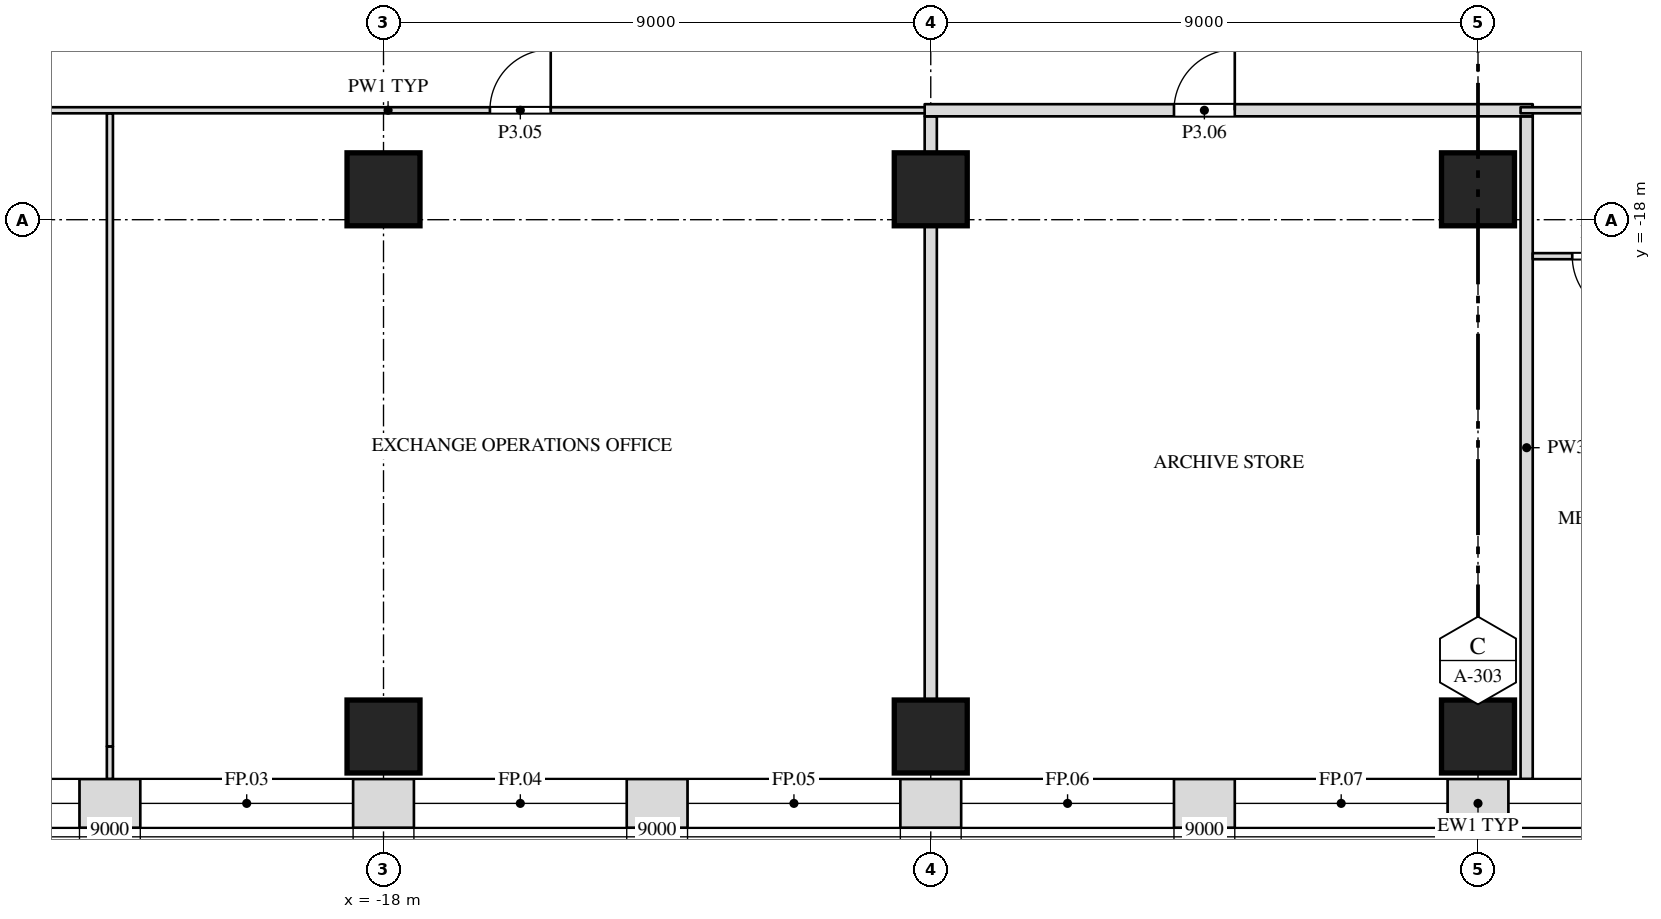
"""IFC4 building model, lengths in metres.
Left out: names, types, materials, properties, quantities, classifications, styles, units other than length and angle.
Written with IfcOpenShell. Run it as: python <this file> out.ifc"""

import sys

from ifc_helpers import new_model, si_unit, direction, frame, frame_2d, origin, origin_2d, place, context, subcontext, project, spatial, rectangle, extrude, element, fill, save


model = new_model("IFC4")
c1 = context("Model", 3, precision=1e-05, world=origin(), true_north=direction((0.0, 1.0)))
c2 = subcontext(c1, "Body", "Model", "MODEL_VIEW")
j1 = project(units=[si_unit("LENGTHUNIT", "METRE"), si_unit("PLANEANGLEUNIT", "RADIAN")], contexts=[c1])
p1 = place(None, origin())
s1 = spatial("IfcSite", under=j1, at=p1, CompositionType="ELEMENT")
p2 = place(p1, origin())
s2 = spatial("IfcBuilding", under=s1, at=p2, CompositionType="ELEMENT")
p3 = place(p2, frame((0.0, 0.0, 21.0)))
s3 = spatial("IfcBuildingStorey", under=s2, at=p3, CompositionType="ELEMENT", Elevation=21.0)
for number, where, z_axis, x_axis in (
    (1, (-18.0, -26.5, 0.0), (0.0, 0.0, 1.0), (1.0, 0.0, 0.0)),
    (2, (-9.0, -26.5, 0.0), (0.0, 0.0, 1.0), (1.0, 0.0, 0.0)),
    (3, (0.0, -26.5, 0.0), (0.0, 0.0, 1.0), (1.0, 0.0, 0.0)),
    (4, (-18.0, -17.5, 0.0), (0.0, 0.0, 1.0), (1.0, 0.0, 0.0)),
    (5, (-9.0, -17.5, 0.0), (0.0, 0.0, 1.0), (1.0, 0.0, 0.0)),
    (6, (0.0, -17.5, 0.0), (0.0, 0.0, 1.0), (1.0, 0.0, 0.0)),
):
    element("IfcColumn", number, at=place(p3, frame(where, z_axis=z_axis, x_axis=x_axis)), inside=s3, PredefinedType="COLUMN", context=c2, shape_type="SweptSolid", body=[
        extrude(rectangle(XDim=1.2, YDim=1.2, at=origin_2d()), origin(), (0.0, 0.0, 1.0), 6.0),
    ])
p4 = place(p3, frame((-22.5, -27.2, 0.0), z_axis=(0.0, 0.0, 1.0), x_axis=(0.0, 1.0, 0.0)))
e7 = element("IfcWall", 7, at=p4, inside=s3, PredefinedType="PARTITIONING", context=c2, shape_type="SweptSolid", body=[
    extrude(rectangle(XDim=0.537, YDim=0.1, at=frame_2d((0.269, 0.0))), origin(), (0.0, 0.0, 1.0), 5.7),
])
p5 = place(p3, frame((-22.5, -26.663, 0.0), z_axis=(0.0, 0.0, 1.0), x_axis=(0.0, 1.0, 0.0)))
e8 = element("IfcWall", 8, at=p5, inside=s3, PredefinedType="PARTITIONING", context=c2, shape_type="SweptSolid", body=[
    extrude(rectangle(XDim=10.413, YDim=0.1, at=frame_2d((5.206, 0.0))), origin(), (0.0, 0.0, 1.0), 5.088),
])
p6 = place(p3, frame((-9.0, -25.9, 0.0), z_axis=(0.0, 0.0, 1.0), x_axis=(0.0, 1.0, 0.0)))
e9 = element("IfcWall", 9, at=p6, inside=s3, PredefinedType="PARTITIONING", context=c2, shape_type="SweptSolid", body=[
    extrude(rectangle(XDim=7.8, YDim=0.2, at=frame_2d((3.9, 0.0))), origin(), (0.0, 0.0, 1.0), 5.088),
])
p7 = place(p3, frame((-9.0, -16.9, 0.0), z_axis=(0.0, 0.0, 1.0), x_axis=(0.0, 1.0, 0.0)))
e10 = element("IfcWall", 10, at=p7, inside=s3, PredefinedType="PARTITIONING", context=c2, shape_type="SweptSolid", body=[
    extrude(rectangle(XDim=0.6, YDim=0.2, at=frame_2d((0.3, 0.0))), origin(), (0.0, 0.0, 1.0), 5.7),
])
p8 = place(p3, frame((0.8, -27.2, 0.0), z_axis=(0.0, 0.0, 1.0), x_axis=(0.0, 1.0, 0.0)))
e11 = element("IfcWall", 11, at=p8, inside=s3, PredefinedType="PARTITIONING", context=c2, shape_type="SweptSolid", body=[
    extrude(rectangle(XDim=10.9, YDim=0.2, at=frame_2d((5.45, 0.0))), origin(), (0.0, 0.0, 1.0), 5.7),
])
p9 = place(p3, frame((0.9, -18.6, 0.0), z_axis=(0.0, 0.0, 1.0), x_axis=(1.0, 0.0, 0.0)))
e12 = element("IfcWall", 12, at=p9, inside=s3, PredefinedType="PARTITIONING", context=c2, shape_type="SweptSolid", body=[
    extrude(rectangle(XDim=7.225, YDim=0.1, at=frame_2d((3.613, 0.0))), origin(), (0.0, 0.0, 1.0), 5.7),
])
p10 = place(p9, frame((0.65, 0.0, 0.0)))
e13 = element("IfcOpeningElement", 13, at=p10, cuts=e12, PredefinedType="OPENING", context=c2, shape_type="SweptSolid", body=[
    extrude(rectangle(XDim=1.0, YDim=2.1, at=frame_2d((0.5, 1.05))), frame((0.0, 0.062, 0.0), z_axis=(0.0, -1.0, 0.0), x_axis=(1.0, 0.0, 0.0)), (0.0, 0.0, 1.0), 0.124),
])
p11 = place(p9, frame((3.15, 0.0, 0.0)))
e14 = element("IfcOpeningElement", 14, at=p11, cuts=e12, PredefinedType="OPENING", context=c2, shape_type="SweptSolid", body=[
    extrude(rectangle(XDim=1.0, YDim=2.1, at=frame_2d((0.5, 1.05))), frame((0.0, 0.062, 0.0), z_axis=(0.0, -1.0, 0.0), x_axis=(1.0, 0.0, 0.0)), (0.0, 0.0, 1.0), 0.124),
])
p12 = place(p9, frame((5.6, 0.0, 0.0)))
e15 = element("IfcOpeningElement", 15, at=p12, cuts=e12, PredefinedType="OPENING", context=c2, shape_type="SweptSolid", body=[
    extrude(rectangle(XDim=1.0, YDim=2.1, at=frame_2d((0.5, 1.05))), frame((0.0, 0.062, 0.0), z_axis=(0.0, -1.0, 0.0), x_axis=(1.0, 0.0, 0.0)), (0.0, 0.0, 1.0), 0.124),
])
p13 = place(p3, frame((-26.95, -16.2, 0.0), z_axis=(0.0, 0.0, 1.0), x_axis=(1.0, 0.0, 0.0)))
e16 = element("IfcWall", 16, at=p13, inside=s3, PredefinedType="PARTITIONING", context=c2, shape_type="SweptSolid", body=[
    extrude(rectangle(XDim=18.05, YDim=0.1, at=frame_2d((9.025, 0.0))), origin(), (0.0, 0.0, 1.0), 5.7),
])
p14 = place(p13, frame((1.7, 0.0, 0.0)))
e17 = element("IfcOpeningElement", 17, at=p14, cuts=e16, PredefinedType="OPENING", context=c2, shape_type="SweptSolid", body=[
    extrude(rectangle(XDim=1.0, YDim=2.1, at=frame_2d((0.5, 1.05))), frame((0.0, 0.062, 0.0), z_axis=(0.0, -1.0, 0.0), x_axis=(1.0, 0.0, 0.0)), (0.0, 0.0, 1.0), 0.124),
])
p15 = place(p13, frame((10.7, 0.0, 0.0)))
e18 = element("IfcOpeningElement", 18, at=p15, cuts=e16, PredefinedType="OPENING", context=c2, shape_type="SweptSolid", body=[
    extrude(rectangle(XDim=1.0, YDim=2.1, at=frame_2d((0.5, 1.05))), frame((0.0, 0.062, 0.0), z_axis=(0.0, -1.0, 0.0), x_axis=(1.0, 0.0, 0.0)), (0.0, 0.0, 1.0), 0.124),
])
p16 = place(p3, frame((-9.1, -16.2, 0.0), z_axis=(0.0, 0.0, 1.0), x_axis=(1.0, 0.0, 0.0)))
e19 = element("IfcWall", 19, at=p16, inside=s3, PredefinedType="PARTITIONING", context=c2, shape_type="SweptSolid", body=[
    extrude(rectangle(XDim=10.0, YDim=0.2, at=frame_2d((5.0, 0.0))), origin(), (0.0, 0.0, 1.0), 5.7),
])
p17 = place(p16, frame((4.1, 0.0, 0.0)))
e20 = element("IfcOpeningElement", 20, at=p17, cuts=e19, PredefinedType="OPENING", context=c2, shape_type="SweptSolid", body=[
    extrude(rectangle(XDim=1.0, YDim=2.1, at=frame_2d((0.5, 1.05))), frame((0.0, 0.112, 0.0), z_axis=(0.0, -1.0, 0.0), x_axis=(1.0, 0.0, 0.0)), (0.0, 0.0, 1.0), 0.224),
])
p18 = place(p3, frame((0.7, -16.2, 0.0), z_axis=(0.0, 0.0, 1.0), x_axis=(1.0, 0.0, 0.0)))
e21 = element("IfcWall", 21, at=p18, inside=s3, PredefinedType="PARTITIONING", context=c2, shape_type="SweptSolid", body=[
    extrude(rectangle(XDim=7.575, YDim=0.1, at=frame_2d((3.788, 0.0))), origin(), (0.0, 0.0, 1.0), 5.7),
])
p19 = place(p18, frame((3.3, 0.0, 0.0)))
e22 = element("IfcOpeningElement", 22, at=p19, cuts=e21, PredefinedType="OPENING", context=c2, shape_type="SweptSolid", body=[
    extrude(rectangle(XDim=1.0, YDim=2.1, at=frame_2d((0.5, 1.05))), frame((0.0, 0.062, 0.0), z_axis=(0.0, -1.0, 0.0), x_axis=(1.0, 0.0, 0.0)), (0.0, 0.0, 1.0), 0.124),
])
p20 = place(p3, frame((-32.948, -27.6, 0.0), z_axis=(0.0, 0.0, 1.0), x_axis=(1.0, 0.0, 0.0)))
e23 = element("IfcWall", 23, at=p20, inside=s3, PredefinedType="SOLIDWALL", context=c2, shape_type="SweptSolid", body=[
    extrude(rectangle(XDim=65.895, YDim=0.8, at=frame_2d((32.948, 0.0))), origin(), (0.0, 0.0, 1.0), 5.7),
])
p21 = place(p20, frame((1.948, 0.0, 1.0)))
e24 = element("IfcOpeningElement", 24, at=p21, cuts=e23, PredefinedType="OPENING", context=c2, shape_type="SweptSolid", body=[
    extrude(rectangle(XDim=3.5, YDim=4.0, at=frame_2d((1.75, 2.0))), frame((0.0, 0.412, 0.0), z_axis=(0.0, -1.0, 0.0), x_axis=(1.0, 0.0, 0.0)), (0.0, 0.0, 1.0), 0.824),
])
p22 = place(p20, frame((6.448, 0.0, 1.0)))
e25 = element("IfcOpeningElement", 25, at=p22, cuts=e23, PredefinedType="OPENING", context=c2, shape_type="SweptSolid", body=[
    extrude(rectangle(XDim=3.5, YDim=4.0, at=frame_2d((1.75, 2.0))), frame((0.0, 0.412, 0.0), z_axis=(0.0, -1.0, 0.0), x_axis=(1.0, 0.0, 0.0)), (0.0, 0.0, 1.0), 0.824),
])
p23 = place(p20, frame((10.948, 0.0, 1.0)))
e26 = element("IfcOpeningElement", 26, at=p23, cuts=e23, PredefinedType="OPENING", context=c2, shape_type="SweptSolid", body=[
    extrude(rectangle(XDim=3.5, YDim=4.0, at=frame_2d((1.75, 2.0))), frame((0.0, 0.412, 0.0), z_axis=(0.0, -1.0, 0.0), x_axis=(1.0, 0.0, 0.0)), (0.0, 0.0, 1.0), 0.824),
])
p24 = place(p20, frame((15.448, 0.0, 1.0)))
e27 = element("IfcOpeningElement", 27, at=p24, cuts=e23, PredefinedType="OPENING", context=c2, shape_type="SweptSolid", body=[
    extrude(rectangle(XDim=3.5, YDim=4.0, at=frame_2d((1.75, 2.0))), frame((0.0, 0.412, 0.0), z_axis=(0.0, -1.0, 0.0), x_axis=(1.0, 0.0, 0.0)), (0.0, 0.0, 1.0), 0.824),
])
p25 = place(p20, frame((19.948, 0.0, 1.0)))
e28 = element("IfcOpeningElement", 28, at=p25, cuts=e23, PredefinedType="OPENING", context=c2, shape_type="SweptSolid", body=[
    extrude(rectangle(XDim=3.5, YDim=4.0, at=frame_2d((1.75, 2.0))), frame((0.0, 0.412, 0.0), z_axis=(0.0, -1.0, 0.0), x_axis=(1.0, 0.0, 0.0)), (0.0, 0.0, 1.0), 0.824),
])
p26 = place(p20, frame((24.448, 0.0, 1.0)))
e29 = element("IfcOpeningElement", 29, at=p26, cuts=e23, PredefinedType="OPENING", context=c2, shape_type="SweptSolid", body=[
    extrude(rectangle(XDim=3.5, YDim=4.0, at=frame_2d((1.75, 2.0))), frame((0.0, 0.412, 0.0), z_axis=(0.0, -1.0, 0.0), x_axis=(1.0, 0.0, 0.0)), (0.0, 0.0, 1.0), 0.824),
])
p27 = place(p20, frame((28.948, 0.0, 1.0)))
e30 = element("IfcOpeningElement", 30, at=p27, cuts=e23, PredefinedType="OPENING", context=c2, shape_type="SweptSolid", body=[
    extrude(rectangle(XDim=3.5, YDim=4.0, at=frame_2d((1.75, 2.0))), frame((0.0, 0.412, 0.0), z_axis=(0.0, -1.0, 0.0), x_axis=(1.0, 0.0, 0.0)), (0.0, 0.0, 1.0), 0.824),
])
p28 = place(p20, frame((33.448, 0.0, 1.0)))
e31 = element("IfcOpeningElement", 31, at=p28, cuts=e23, PredefinedType="OPENING", context=c2, shape_type="SweptSolid", body=[
    extrude(rectangle(XDim=3.5, YDim=4.0, at=frame_2d((1.75, 2.0))), frame((0.0, 0.412, 0.0), z_axis=(0.0, -1.0, 0.0), x_axis=(1.0, 0.0, 0.0)), (0.0, 0.0, 1.0), 0.824),
])
p29 = place(p20, frame((37.948, 0.0, 1.0)))
e32 = element("IfcOpeningElement", 32, at=p29, cuts=e23, PredefinedType="OPENING", context=c2, shape_type="SweptSolid", body=[
    extrude(rectangle(XDim=3.5, YDim=4.0, at=frame_2d((1.75, 2.0))), frame((0.0, 0.412, 0.0), z_axis=(0.0, -1.0, 0.0), x_axis=(1.0, 0.0, 0.0)), (0.0, 0.0, 1.0), 0.824),
])
p30 = place(p20, frame((42.448, 0.0, 1.0)))
e33 = element("IfcOpeningElement", 33, at=p30, cuts=e23, PredefinedType="OPENING", context=c2, shape_type="SweptSolid", body=[
    extrude(rectangle(XDim=3.5, YDim=4.0, at=frame_2d((1.75, 2.0))), frame((0.0, 0.412, 0.0), z_axis=(0.0, -1.0, 0.0), x_axis=(1.0, 0.0, 0.0)), (0.0, 0.0, 1.0), 0.824),
])
p31 = place(p20, frame((46.948, 0.0, 1.0)))
e34 = element("IfcOpeningElement", 34, at=p31, cuts=e23, PredefinedType="OPENING", context=c2, shape_type="SweptSolid", body=[
    extrude(rectangle(XDim=3.5, YDim=4.0, at=frame_2d((1.75, 2.0))), frame((0.0, 0.412, 0.0), z_axis=(0.0, -1.0, 0.0), x_axis=(1.0, 0.0, 0.0)), (0.0, 0.0, 1.0), 0.824),
])
p32 = place(p20, frame((51.448, 0.0, 1.0)))
e35 = element("IfcOpeningElement", 35, at=p32, cuts=e23, PredefinedType="OPENING", context=c2, shape_type="SweptSolid", body=[
    extrude(rectangle(XDim=3.5, YDim=4.0, at=frame_2d((1.75, 2.0))), frame((0.0, 0.412, 0.0), z_axis=(0.0, -1.0, 0.0), x_axis=(1.0, 0.0, 0.0)), (0.0, 0.0, 1.0), 0.824),
])
p33 = place(p20, frame((55.948, 0.0, 1.0)))
e36 = element("IfcOpeningElement", 36, at=p33, cuts=e23, PredefinedType="OPENING", context=c2, shape_type="SweptSolid", body=[
    extrude(rectangle(XDim=3.5, YDim=4.0, at=frame_2d((1.75, 2.0))), frame((0.0, 0.412, 0.0), z_axis=(0.0, -1.0, 0.0), x_axis=(1.0, 0.0, 0.0)), (0.0, 0.0, 1.0), 0.824),
])
p34 = place(p20, frame((60.448, 0.0, 1.0)))
e37 = element("IfcOpeningElement", 37, at=p34, cuts=e23, PredefinedType="OPENING", context=c2, shape_type="SweptSolid", body=[
    extrude(rectangle(XDim=3.5, YDim=4.0, at=frame_2d((1.75, 2.0))), frame((0.0, 0.412, 0.0), z_axis=(0.0, -1.0, 0.0), x_axis=(1.0, 0.0, 0.0)), (0.0, 0.0, 1.0), 0.824),
])
p35 = place(p10, origin())
e38 = element("IfcDoor", 38, at=p35, inside=s3, OperationType="SINGLE_SWING_LEFT", PredefinedType="DOOR", context=c2, shape_type="SweptSolid", body=[
    extrude(rectangle(XDim=1.0, YDim=2.1, at=frame_2d((0.5, 1.05))), frame((0.0, 0.025, 0.0), z_axis=(0.0, -1.0, 0.0), x_axis=(1.0, 0.0, 0.0)), (0.0, 0.0, 1.0), 0.05),
])
fill(e13, e38)
p36 = place(p15, origin())
e39 = element("IfcDoor", 39, at=p36, inside=s3, OperationType="SINGLE_SWING_RIGHT", PredefinedType="DOOR", context=c2, shape_type="SweptSolid", body=[
    extrude(rectangle(XDim=1.0, YDim=2.1, at=frame_2d((0.5, 1.05))), frame((0.0, 0.025, 0.0), z_axis=(0.0, -1.0, 0.0), x_axis=(1.0, 0.0, 0.0)), (0.0, 0.0, 1.0), 0.05),
])
fill(e18, e39)
p37 = place(p17, origin())
e40 = element("IfcDoor", 40, at=p37, inside=s3, OperationType="SINGLE_SWING_RIGHT", PredefinedType="DOOR", context=c2, shape_type="SweptSolid", body=[
    extrude(rectangle(XDim=1.0, YDim=2.1, at=frame_2d((0.5, 1.05))), frame((0.0, 0.025, 0.0), z_axis=(0.0, -1.0, 0.0), x_axis=(1.0, 0.0, 0.0)), (0.0, 0.0, 1.0), 0.05),
])
fill(e20, e40)
p38 = place(p22, origin())
e41 = element("IfcWindow", 41, at=p38, inside=s3, PartitioningType="SINGLE_PANEL", PredefinedType="WINDOW", context=c2, shape_type="SweptSolid", body=[
    extrude(rectangle(XDim=3.5, YDim=4.0, at=frame_2d((1.75, 2.0))), frame((0.0, 0.03, 0.0), z_axis=(0.0, -1.0, 0.0), x_axis=(1.0, 0.0, 0.0)), (0.0, 0.0, 1.0), 0.06),
])
fill(e25, e41)
p39 = place(p23, origin())
e42 = element("IfcWindow", 42, at=p39, inside=s3, PartitioningType="SINGLE_PANEL", PredefinedType="WINDOW", context=c2, shape_type="SweptSolid", body=[
    extrude(rectangle(XDim=3.5, YDim=4.0, at=frame_2d((1.75, 2.0))), frame((0.0, 0.03, 0.0), z_axis=(0.0, -1.0, 0.0), x_axis=(1.0, 0.0, 0.0)), (0.0, 0.0, 1.0), 0.06),
])
fill(e26, e42)
p40 = place(p24, origin())
e43 = element("IfcWindow", 43, at=p40, inside=s3, PartitioningType="SINGLE_PANEL", PredefinedType="WINDOW", context=c2, shape_type="SweptSolid", body=[
    extrude(rectangle(XDim=3.5, YDim=4.0, at=frame_2d((1.75, 2.0))), frame((0.0, 0.03, 0.0), z_axis=(0.0, -1.0, 0.0), x_axis=(1.0, 0.0, 0.0)), (0.0, 0.0, 1.0), 0.06),
])
fill(e27, e43)
p41 = place(p25, origin())
e44 = element("IfcWindow", 44, at=p41, inside=s3, PartitioningType="SINGLE_PANEL", PredefinedType="WINDOW", context=c2, shape_type="SweptSolid", body=[
    extrude(rectangle(XDim=3.5, YDim=4.0, at=frame_2d((1.75, 2.0))), frame((0.0, 0.03, 0.0), z_axis=(0.0, -1.0, 0.0), x_axis=(1.0, 0.0, 0.0)), (0.0, 0.0, 1.0), 0.06),
])
fill(e28, e44)
p42 = place(p26, origin())
e45 = element("IfcWindow", 45, at=p42, inside=s3, PartitioningType="SINGLE_PANEL", PredefinedType="WINDOW", context=c2, shape_type="SweptSolid", body=[
    extrude(rectangle(XDim=3.5, YDim=4.0, at=frame_2d((1.75, 2.0))), frame((0.0, 0.03, 0.0), z_axis=(0.0, -1.0, 0.0), x_axis=(1.0, 0.0, 0.0)), (0.0, 0.0, 1.0), 0.06),
])
fill(e29, e45)
p43 = place(p27, origin())
e46 = element("IfcWindow", 46, at=p43, inside=s3, PartitioningType="SINGLE_PANEL", PredefinedType="WINDOW", context=c2, shape_type="SweptSolid", body=[
    extrude(rectangle(XDim=3.5, YDim=4.0, at=frame_2d((1.75, 2.0))), frame((0.0, 0.03, 0.0), z_axis=(0.0, -1.0, 0.0), x_axis=(1.0, 0.0, 0.0)), (0.0, 0.0, 1.0), 0.06),
])
fill(e30, e46)
p44 = place(p28, origin())
e47 = element("IfcWindow", 47, at=p44, inside=s3, PartitioningType="SINGLE_PANEL", PredefinedType="WINDOW", context=c2, shape_type="SweptSolid", body=[
    extrude(rectangle(XDim=3.5, YDim=4.0, at=frame_2d((1.75, 2.0))), frame((0.0, 0.03, 0.0), z_axis=(0.0, -1.0, 0.0), x_axis=(1.0, 0.0, 0.0)), (0.0, 0.0, 1.0), 0.06),
])
fill(e31, e47)
save(model, sys.argv[1])
